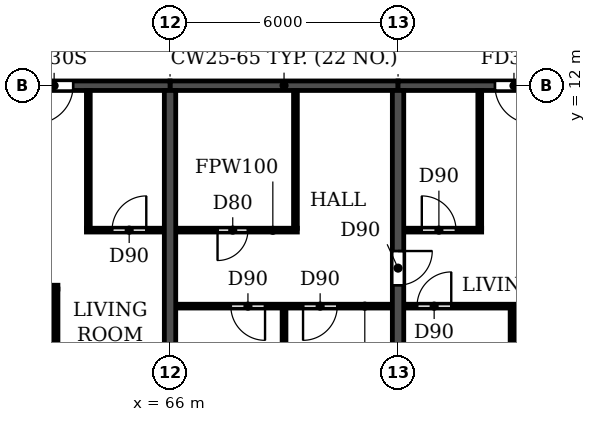
"""IFC4 building model, lengths in metres.
Left out: names, types, materials, properties, quantities, classifications, styles, units other than length and angle.
Written with IfcOpenShell. Run it as: python <this file> out.ifc"""

import sys

from ifc_helpers import new_model, si_unit, direction, frame, frame_2d, origin, place, context, subcontext, project, spatial, rectangle, extrude, element, fill, save


model = new_model("IFC4")
c1 = context("Model", 3, precision=1e-05, world=origin(), true_north=direction((0.0, 1.0)))
c2 = subcontext(c1, "Body", "Model", "MODEL_VIEW")
j1 = project(units=[si_unit("LENGTHUNIT", "METRE"), si_unit("PLANEANGLEUNIT", "RADIAN")], contexts=[c1])
p1 = place(None, origin())
s1 = spatial("IfcSite", under=j1, at=p1, CompositionType="ELEMENT")
p2 = place(p1, origin())
s2 = spatial("IfcBuilding", under=s1, at=p2, CompositionType="ELEMENT")
p3 = place(p2, frame((0.0, 0.0, 125.7)))
s3 = spatial("IfcBuildingStorey", under=s2, at=p3, CompositionType="ELEMENT", Elevation=125.7)
p4 = place(p3, frame((66.0, 0.2, 0.0), z_axis=(0.0, 0.0, 1.0), x_axis=(0.0, 1.0, 0.0)))
e1 = element("IfcWall", 1, at=p4, inside=s3, PredefinedType="SHEAR", context=c2, shape_type="SweptSolid", body=[
    extrude(rectangle(XDim=11.675, YDim=0.3, at=frame_2d((5.837, 0.0))), origin(), (0.0, 0.0, 1.0), 3.07),
])
p5 = place(p3, frame((72.0, 0.2, 0.0), z_axis=(0.0, 0.0, 1.0), x_axis=(0.0, 1.0, 0.0)))
e2 = element("IfcWall", 2, at=p5, inside=s3, PredefinedType="SHEAR", context=c2, shape_type="SweptSolid", body=[
    extrude(rectangle(XDim=11.675, YDim=0.3, at=frame_2d((5.837, 0.0))), origin(), (0.0, 0.0, 1.0), 3.07),
])
p6 = place(p5, frame((6.55, 0.0, 0.0)))
e3 = element("IfcOpeningElement", 3, at=p6, cuts=e2, PredefinedType="OPENING", context=c2, shape_type="SweptSolid", body=[
    extrude(rectangle(XDim=0.9, YDim=2.1, at=frame_2d((0.45, 1.05))), frame((0.0, 0.16, 0.0), z_axis=(0.0, -1.0, 0.0), x_axis=(1.0, 0.0, 0.0)), (0.0, 0.0, 1.0), 0.32),
])
p7 = place(p3, frame((60.0, 12.0, 0.0), z_axis=(0.0, 0.0, 1.0), x_axis=(1.0, 0.0, 0.0)))
e4 = element("IfcWall", 4, at=p7, inside=s3, PredefinedType="SHEAR", context=c2, shape_type="SweptSolid", body=[
    extrude(rectangle(XDim=6.0, YDim=0.25, at=frame_2d((3.0, 0.0))), origin(), (0.0, 0.0, 1.0), 2.47),
])
p8 = place(p7, frame((2.45, 0.0, 0.0)))
e5 = element("IfcOpeningElement", 5, at=p8, cuts=e4, PredefinedType="OPENING", context=c2, shape_type="SweptSolid", body=[
    extrude(rectangle(XDim=1.0, YDim=2.1, at=frame_2d((0.5, 1.05))), frame((0.0, 0.135, 0.0), z_axis=(0.0, -1.0, 0.0), x_axis=(1.0, 0.0, 0.0)), (0.0, 0.0, 1.0), 0.27),
])
p9 = place(p3, frame((66.0, 12.0, 0.0), z_axis=(0.0, 0.0, 1.0), x_axis=(1.0, 0.0, 0.0)))
e6 = element("IfcWall", 6, at=p9, inside=s3, PredefinedType="SHEAR", context=c2, shape_type="SweptSolid", body=[
    extrude(rectangle(XDim=6.0, YDim=0.25, at=frame_2d((3.0, 0.0))), origin(), (0.0, 0.0, 1.0), 2.47),
])
p10 = place(p3, frame((72.0, 12.0, 0.0), z_axis=(0.0, 0.0, 1.0), x_axis=(1.0, 0.0, 0.0)))
e7 = element("IfcWall", 7, at=p10, inside=s3, PredefinedType="SHEAR", context=c2, shape_type="SweptSolid", body=[
    extrude(rectangle(XDim=6.0, YDim=0.25, at=frame_2d((3.0, 0.0))), origin(), (0.0, 0.0, 1.0), 2.47),
])
p11 = place(p10, frame((2.55, 0.0, 0.0)))
e8 = element("IfcOpeningElement", 8, at=p11, cuts=e7, PredefinedType="OPENING", context=c2, shape_type="SweptSolid", body=[
    extrude(rectangle(XDim=1.0, YDim=2.1, at=frame_2d((0.5, 1.05))), frame((0.0, 0.135, 0.0), z_axis=(0.0, -1.0, 0.0), x_axis=(1.0, 0.0, 0.0)), (0.0, 0.0, 1.0), 0.27),
])
p12 = place(p3, frame((66.16, 6.2, 0.0), z_axis=(0.0, 0.0, 1.0), x_axis=(1.0, 0.0, 0.0)))
e9 = element("IfcWall", 9, at=p12, inside=s3, PredefinedType="PARTITIONING", context=c2, shape_type="SweptSolid", body=[
    extrude(rectangle(XDim=5.68, YDim=0.1, at=frame_2d((2.84, 0.0))), origin(), (0.0, 0.0, 1.0), 3.07),
])
p13 = place(p12, frame((1.44, 0.0, 0.0)))
e10 = element("IfcOpeningElement", 10, at=p13, cuts=e9, PredefinedType="OPENING", context=c2, shape_type="SweptSolid", body=[
    extrude(rectangle(XDim=0.9, YDim=2.1, at=frame_2d((0.45, 1.05))), frame((0.0, 0.06, 0.0), z_axis=(0.0, -1.0, 0.0), x_axis=(1.0, 0.0, 0.0)), (0.0, 0.0, 1.0), 0.12),
])
p14 = place(p12, frame((3.34, 0.0, 0.0)))
e11 = element("IfcOpeningElement", 11, at=p14, cuts=e9, PredefinedType="OPENING", context=c2, shape_type="SweptSolid", body=[
    extrude(rectangle(XDim=0.9, YDim=2.1, at=frame_2d((0.45, 1.05))), frame((0.0, 0.06, 0.0), z_axis=(0.0, -1.0, 0.0), x_axis=(1.0, 0.0, 0.0)), (0.0, 0.0, 1.0), 0.12),
])
p15 = place(p3, frame((72.16, 6.2, 0.0), z_axis=(0.0, 0.0, 1.0), x_axis=(1.0, 0.0, 0.0)))
e12 = element("IfcWall", 12, at=p15, inside=s3, PredefinedType="PARTITIONING", context=c2, shape_type="SweptSolid", body=[
    extrude(rectangle(XDim=2.89, YDim=0.1, at=frame_2d((1.445, 0.0))), origin(), (0.0, 0.0, 1.0), 3.07),
])
p16 = place(p15, frame((0.34, 0.0, 0.0)))
e13 = element("IfcOpeningElement", 13, at=p16, cuts=e12, PredefinedType="OPENING", context=c2, shape_type="SweptSolid", body=[
    extrude(rectangle(XDim=0.9, YDim=2.1, at=frame_2d((0.45, 1.05))), frame((0.0, 0.06, 0.0), z_axis=(0.0, -1.0, 0.0), x_axis=(1.0, 0.0, 0.0)), (0.0, 0.0, 1.0), 0.12),
])
p17 = place(p3, frame((60.16, 6.7, 0.0), z_axis=(0.0, 0.0, 1.0), x_axis=(1.0, 0.0, 0.0)))
e14 = element("IfcWall", 14, at=p17, inside=s3, PredefinedType="PARTITIONING", context=c2, shape_type="SweptSolid", body=[
    extrude(rectangle(XDim=2.89, YDim=0.1, at=frame_2d((1.445, 0.0))), origin(), (0.0, 0.0, 1.0), 3.07),
])
p18 = place(p17, frame((0.34, 0.0, 0.0)))
e15 = element("IfcOpeningElement", 15, at=p18, cuts=e14, PredefinedType="OPENING", context=c2, shape_type="SweptSolid", body=[
    extrude(rectangle(XDim=0.9, YDim=2.1, at=frame_2d((0.45, 1.05))), frame((0.0, 0.06, 0.0), z_axis=(0.0, -1.0, 0.0), x_axis=(1.0, 0.0, 0.0)), (0.0, 0.0, 1.0), 0.12),
])
p19 = place(p3, frame((63.8, 8.2, 0.0), z_axis=(0.0, 0.0, 1.0), x_axis=(1.0, 0.0, 0.0)))
e16 = element("IfcWall", 16, at=p19, inside=s3, PredefinedType="PARTITIONING", context=c2, shape_type="SweptSolid", body=[
    extrude(rectangle(XDim=2.04, YDim=0.1, at=frame_2d((1.02, 0.0))), origin(), (0.0, 0.0, 1.0), 3.07),
])
p20 = place(p19, frame((0.675, 0.0, 0.0)))
e17 = element("IfcOpeningElement", 17, at=p20, cuts=e16, PredefinedType="OPENING", context=c2, shape_type="SweptSolid", body=[
    extrude(rectangle(XDim=0.9, YDim=2.1, at=frame_2d((0.45, 1.05))), frame((0.0, 0.06, 0.0), z_axis=(0.0, -1.0, 0.0), x_axis=(1.0, 0.0, 0.0)), (0.0, 0.0, 1.0), 0.12),
])
p21 = place(p3, frame((66.16, 8.2, 0.0), z_axis=(0.0, 0.0, 1.0), x_axis=(1.0, 0.0, 0.0)))
e18 = element("IfcWall", 18, at=p21, inside=s3, PredefinedType="PARTITIONING", context=c2, shape_type="SweptSolid", body=[
    extrude(rectangle(XDim=3.19, YDim=0.1, at=frame_2d((1.595, 0.0))), origin(), (0.0, 0.0, 1.0), 3.07),
])
p22 = place(p21, frame((1.09, 0.0, 0.0)))
e19 = element("IfcOpeningElement", 19, at=p22, cuts=e18, PredefinedType="OPENING", context=c2, shape_type="SweptSolid", body=[
    extrude(rectangle(XDim=0.8, YDim=2.1, at=frame_2d((0.4, 1.05))), frame((0.0, 0.06, 0.0), z_axis=(0.0, -1.0, 0.0), x_axis=(1.0, 0.0, 0.0)), (0.0, 0.0, 1.0), 0.12),
])
p23 = place(p3, frame((72.16, 8.2, 0.0), z_axis=(0.0, 0.0, 1.0), x_axis=(1.0, 0.0, 0.0)))
e20 = element("IfcWall", 20, at=p23, inside=s3, PredefinedType="PARTITIONING", context=c2, shape_type="SweptSolid", body=[
    extrude(rectangle(XDim=2.04, YDim=0.1, at=frame_2d((1.02, 0.0))), origin(), (0.0, 0.0, 1.0), 3.07),
])
p24 = place(p23, frame((0.465, 0.0, 0.0)))
e21 = element("IfcOpeningElement", 21, at=p24, cuts=e20, PredefinedType="OPENING", context=c2, shape_type="SweptSolid", body=[
    extrude(rectangle(XDim=0.9, YDim=2.1, at=frame_2d((0.45, 1.05))), frame((0.0, 0.06, 0.0), z_axis=(0.0, -1.0, 0.0), x_axis=(1.0, 0.0, 0.0)), (0.0, 0.0, 1.0), 0.12),
])
p25 = place(p3, frame((63.0, 0.06, 0.0), z_axis=(0.0, 0.0, 1.0), x_axis=(0.0, 1.0, 0.0)))
e22 = element("IfcWall", 22, at=p25, inside=s3, PredefinedType="PARTITIONING", context=c2, shape_type="SweptSolid", body=[
    extrude(rectangle(XDim=6.59, YDim=0.1, at=frame_2d((3.295, 0.0))), origin(), (0.0, 0.0, 1.0), 3.07),
])
p26 = place(p3, frame((63.85, 8.25, 0.0), z_axis=(0.0, 0.0, 1.0), x_axis=(0.0, 1.0, 0.0)))
e23 = element("IfcWall", 23, at=p26, inside=s3, PredefinedType="PARTITIONING", context=c2, shape_type="SweptSolid", body=[
    extrude(rectangle(XDim=3.615, YDim=0.1, at=frame_2d((1.808, 0.0))), origin(), (0.0, 0.0, 1.0), 3.07),
])
p27 = place(p3, frame((69.0, 0.06, 0.0), z_axis=(0.0, 0.0, 1.0), x_axis=(0.0, 1.0, 0.0)))
e24 = element("IfcWall", 24, at=p27, inside=s3, PredefinedType="PARTITIONING", context=c2, shape_type="SweptSolid", body=[
    extrude(rectangle(XDim=6.09, YDim=0.1, at=frame_2d((3.045, 0.0))), origin(), (0.0, 0.0, 1.0), 3.07),
])
for number, where, z_axis, x_axis in (
    (25, (69.3, 8.25, 0.0), (0.0, 0.0, 1.0), (0.0, 1.0, 0.0)),
    (26, (74.15, 8.25, 0.0), (0.0, 0.0, 1.0), (0.0, 1.0, 0.0)),
):
    element("IfcWall", number, at=place(p3, frame(where, z_axis=z_axis, x_axis=x_axis)), inside=s3, PredefinedType="PARTITIONING", context=c2, shape_type="SweptSolid", body=[
        extrude(rectangle(XDim=3.615, YDim=0.1, at=frame_2d((1.808, 0.0))), origin(), (0.0, 0.0, 1.0), 3.07),
    ])
p28 = place(p3, frame((75.0, 0.06, 0.0), z_axis=(0.0, 0.0, 1.0), x_axis=(0.0, 1.0, 0.0)))
e27 = element("IfcWall", 27, at=p28, inside=s3, PredefinedType="PARTITIONING", context=c2, shape_type="SweptSolid", body=[
    extrude(rectangle(XDim=6.09, YDim=0.1, at=frame_2d((3.045, 0.0))), origin(), (0.0, 0.0, 1.0), 3.07),
])
p29 = place(p8, frame((1.0, 0.0, 0.0), z_axis=(0.0, 0.0, 1.0), x_axis=(-1.0, 0.0, 0.0)))
e28 = element("IfcDoor", 28, at=p29, inside=s3, OperationType="SINGLE_SWING_RIGHT", PredefinedType="DOOR", context=c2, shape_type="SweptSolid", body=[
    extrude(rectangle(XDim=1.0, YDim=2.1, at=frame_2d((0.5, 1.05))), frame((0.0, 0.025, 0.0), z_axis=(0.0, -1.0, 0.0), x_axis=(1.0, 0.0, 0.0)), (0.0, 0.0, 1.0), 0.05),
])
fill(e5, e28)
p30 = place(p20, origin())
e29 = element("IfcDoor", 29, at=p30, inside=s3, OperationType="SINGLE_SWING_RIGHT", PredefinedType="DOOR", context=c2, shape_type="SweptSolid", body=[
    extrude(rectangle(XDim=0.9, YDim=2.1, at=frame_2d((0.45, 1.05))), frame((0.0, 0.025, 0.0), z_axis=(0.0, -1.0, 0.0), x_axis=(1.0, 0.0, 0.0)), (0.0, 0.0, 1.0), 0.05),
])
fill(e17, e29)
p31 = place(p22, frame((0.8, 0.0, 0.0), z_axis=(0.0, 0.0, 1.0), x_axis=(-1.0, 0.0, 0.0)))
e30 = element("IfcDoor", 30, at=p31, inside=s3, OperationType="SINGLE_SWING_RIGHT", PredefinedType="DOOR", context=c2, shape_type="SweptSolid", body=[
    extrude(rectangle(XDim=0.8, YDim=2.1, at=frame_2d((0.4, 1.05))), frame((0.0, 0.025, 0.0), z_axis=(0.0, -1.0, 0.0), x_axis=(1.0, 0.0, 0.0)), (0.0, 0.0, 1.0), 0.05),
])
fill(e19, e30)
p32 = place(p13, frame((0.9, 0.0, 0.0), z_axis=(0.0, 0.0, 1.0), x_axis=(-1.0, 0.0, 0.0)))
e31 = element("IfcDoor", 31, at=p32, inside=s3, OperationType="SINGLE_SWING_LEFT", PredefinedType="DOOR", context=c2, shape_type="SweptSolid", body=[
    extrude(rectangle(XDim=0.9, YDim=2.1, at=frame_2d((0.45, 1.05))), frame((0.0, 0.025, 0.0), z_axis=(0.0, -1.0, 0.0), x_axis=(1.0, 0.0, 0.0)), (0.0, 0.0, 1.0), 0.05),
])
fill(e10, e31)
p33 = place(p14, frame((0.9, 0.0, 0.0), z_axis=(0.0, 0.0, 1.0), x_axis=(-1.0, 0.0, 0.0)))
e32 = element("IfcDoor", 32, at=p33, inside=s3, OperationType="SINGLE_SWING_RIGHT", PredefinedType="DOOR", context=c2, shape_type="SweptSolid", body=[
    extrude(rectangle(XDim=0.9, YDim=2.1, at=frame_2d((0.45, 1.05))), frame((0.0, 0.025, 0.0), z_axis=(0.0, -1.0, 0.0), x_axis=(1.0, 0.0, 0.0)), (0.0, 0.0, 1.0), 0.05),
])
fill(e11, e32)
p34 = place(p6, frame((0.9, 0.0, 0.0), z_axis=(0.0, 0.0, 1.0), x_axis=(-1.0, 0.0, 0.0)))
e33 = element("IfcDoor", 33, at=p34, inside=s3, OperationType="SINGLE_SWING_LEFT", PredefinedType="DOOR", context=c2, shape_type="SweptSolid", body=[
    extrude(rectangle(XDim=0.9, YDim=2.1, at=frame_2d((0.45, 1.05))), frame((0.0, 0.025, 0.0), z_axis=(0.0, -1.0, 0.0), x_axis=(1.0, 0.0, 0.0)), (0.0, 0.0, 1.0), 0.05),
])
fill(e3, e33)
p35 = place(p16, origin())
e34 = element("IfcDoor", 34, at=p35, inside=s3, OperationType="SINGLE_SWING_RIGHT", PredefinedType="DOOR", context=c2, shape_type="SweptSolid", body=[
    extrude(rectangle(XDim=0.9, YDim=2.1, at=frame_2d((0.45, 1.05))), frame((0.0, 0.025, 0.0), z_axis=(0.0, -1.0, 0.0), x_axis=(1.0, 0.0, 0.0)), (0.0, 0.0, 1.0), 0.05),
])
fill(e13, e34)
p36 = place(p24, origin())
e35 = element("IfcDoor", 35, at=p36, inside=s3, OperationType="SINGLE_SWING_LEFT", PredefinedType="DOOR", context=c2, shape_type="SweptSolid", body=[
    extrude(rectangle(XDim=0.9, YDim=2.1, at=frame_2d((0.45, 1.05))), frame((0.0, 0.025, 0.0), z_axis=(0.0, -1.0, 0.0), x_axis=(1.0, 0.0, 0.0)), (0.0, 0.0, 1.0), 0.05),
])
fill(e21, e35)
p37 = place(p11, frame((1.0, 0.0, 0.0), z_axis=(0.0, 0.0, 1.0), x_axis=(-1.0, 0.0, 0.0)))
e36 = element("IfcDoor", 36, at=p37, inside=s3, OperationType="SINGLE_SWING_LEFT", PredefinedType="DOOR", context=c2, shape_type="SweptSolid", body=[
    extrude(rectangle(XDim=1.0, YDim=2.1, at=frame_2d((0.5, 1.05))), frame((0.0, 0.025, 0.0), z_axis=(0.0, -1.0, 0.0), x_axis=(1.0, 0.0, 0.0)), (0.0, 0.0, 1.0), 0.05),
])
fill(e8, e36)
save(model, sys.argv[1])
